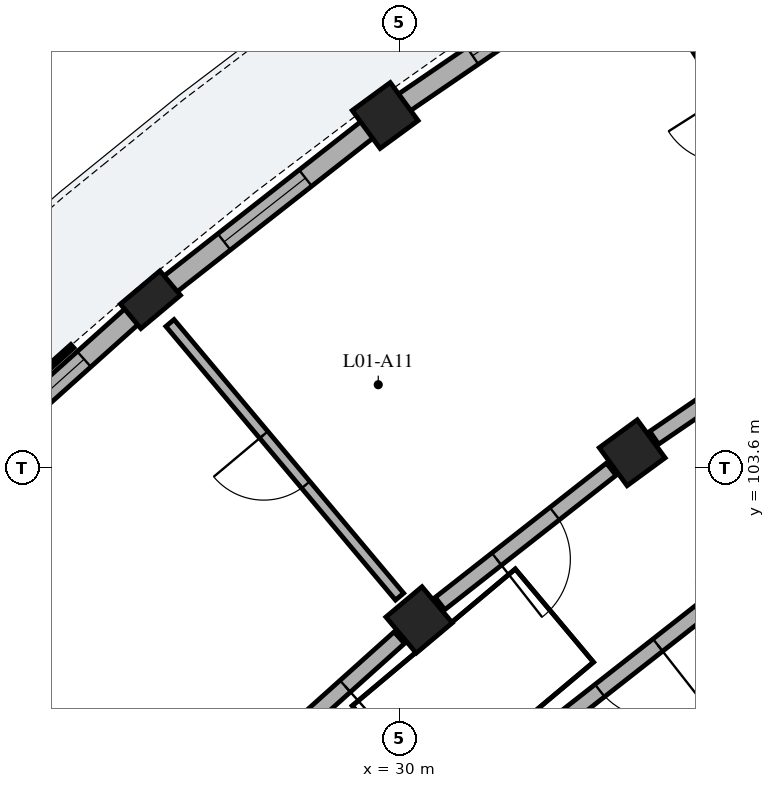
"""IFC4 building model, lengths in metres.
Left out: names, types, materials, properties, quantities, classifications, styles, units other than length and angle.
Written with IfcOpenShell. Run it as: python <this file> out.ifc"""

import sys

from ifc_helpers import new_model, si_unit, direction, frame, frame_2d, origin, origin_2d, place, context, subcontext, project, spatial, rectangle, extrude, element, fill, save


model = new_model("IFC4")
c1 = context("Model", 3, precision=1e-05, world=origin(), true_north=direction((0.0, 1.0)))
c2 = subcontext(c1, "Body", "Model", "MODEL_VIEW")
j1 = project(units=[si_unit("LENGTHUNIT", "METRE"), si_unit("PLANEANGLEUNIT", "RADIAN")], contexts=[c1])
p1 = place(None, origin())
s1 = spatial("IfcSite", under=j1, at=p1, CompositionType="ELEMENT")
p2 = place(p1, origin())
s2 = spatial("IfcBuilding", under=s1, at=p2, CompositionType="ELEMENT")
p3 = place(p2, frame((0.0, 0.0, 4.76)))
s3 = spatial("IfcBuildingStorey", under=s2, at=p3, CompositionType="ELEMENT", Elevation=4.76)
for number, where, z_axis, x_axis in (
    (1, (33.061, 103.804, 0.0), (0.0, 0.0, 1.0), (-0.591, 0.807, 0.0)),
    (2, (29.811, 108.241, 0.0), (0.0, 0.0, 1.0), (-0.591, 0.807, 0.0)),
    (3, (30.257, 101.605, 0.0), (0.0, 0.0, 1.0), (-0.643, 0.766, 0.0)),
):
    element("IfcColumn", number, at=place(p3, frame(where, z_axis=z_axis, x_axis=x_axis)), inside=s3, PredefinedType="COLUMN", context=c2, shape_type="SweptSolid", body=[
        extrude(rectangle(XDim=0.62, YDim=0.62, at=origin_2d()), origin(), (0.0, 0.0, 1.0), 3.825),
    ])
p4 = place(p3, frame((26.722, 105.818, 0.0), z_axis=(0.0, 0.0, 1.0), x_axis=(-0.642787636427, 0.766044420681, 0.0)))
e4 = element("IfcColumn", 4, at=p4, inside=s3, PredefinedType="PILASTER", context=c2, shape_type="SweptSolid", body=[
    extrude(rectangle(XDim=0.42, YDim=0.68, at=origin_2d()), origin(), (0.0, 0.0, 1.0), 3.825),
])
p5 = place(p3, frame((32.904, 110.354, 0.0), z_axis=(0.0, 0.0, 1.0), x_axis=(-0.825744165268, -0.564044832904, 0.0)))
e5 = element("IfcWall", 5, at=p5, inside=s3, PredefinedType="SOLIDWALL", context=c2, shape_type="SweptSolid", body=[
    extrude(rectangle(XDim=3.466, YDim=0.27, at=frame_2d((1.733, 0.0))), origin(), (0.0, 0.0, 1.0), 3.075),
])
p6 = place(p5, frame((1.113, 0.0, 0.55)))
e6 = element("IfcOpeningElement", 6, at=p6, cuts=e5, PredefinedType="OPENING", context=c2, shape_type="SweptSolid", body=[
    extrude(rectangle(XDim=1.24, YDim=1.535, at=frame_2d((0.62, 0.768))), frame((0.0, 0.145, 0.0), z_axis=(0.0, -1.0, 0.0), x_axis=(1.0, 0.0, 0.0)), (0.0, 0.0, 1.0), 0.29),
])
p7 = place(p3, frame((29.591, 108.068, 0.0), z_axis=(0.0, 0.0, 1.0), x_axis=(-0.786811832484, -0.617192952214, 0.0)))
e7 = element("IfcWall", 7, at=p7, inside=s3, PredefinedType="SOLIDWALL", context=c2, shape_type="SweptSolid", body=[
    extrude(rectangle(XDim=3.466, YDim=0.27, at=frame_2d((1.733, 0.0))), origin(), (0.0, 0.0, 1.0), 3.075),
])
p8 = place(p7, frame((1.053, 0.0, 0.55)))
e8 = element("IfcOpeningElement", 8, at=p8, cuts=e7, PredefinedType="OPENING", context=c2, shape_type="SweptSolid", body=[
    extrude(rectangle(XDim=1.36, YDim=1.61, at=frame_2d((0.68, 0.805))), frame((0.0, 0.145, 0.0), z_axis=(0.0, -1.0, 0.0), x_axis=(1.0, 0.0, 0.0)), (0.0, 0.0, 1.0), 0.29),
])
p9 = place(p3, frame((26.588, 105.698, 0.0), z_axis=(0.0, 0.0, 1.0), x_axis=(-0.744424533251, -0.667706607945, 0.0)))
e9 = element("IfcWall", 9, at=p9, inside=s3, PredefinedType="SOLIDWALL", context=c2, shape_type="SweptSolid", body=[
    extrude(rectangle(XDim=3.466, YDim=0.27, at=frame_2d((1.733, 0.0))), origin(), (0.0, 0.0, 1.0), 3.075),
])
p10 = place(p9, frame((0.993, 0.0, 0.55)))
e10 = element("IfcOpeningElement", 10, at=p10, cuts=e9, PredefinedType="OPENING", context=c2, shape_type="SweptSolid", body=[
    extrude(rectangle(XDim=1.48, YDim=1.46, at=frame_2d((0.74, 0.73))), frame((0.0, 0.145, 0.0), z_axis=(0.0, -1.0, 0.0), x_axis=(1.0, 0.0, 0.0)), (0.0, 0.0, 1.0), 0.29),
])
p11 = place(p3, frame((35.789, 106.151, 0.0), z_axis=(0.0, 0.0, 1.0), x_axis=(-0.536492262982, 0.843905238614, 0.0)))
e11 = element("IfcWall", 11, at=p11, inside=s3, PredefinedType="PARTITIONING", context=c2, shape_type="SweptSolid", body=[
    extrude(rectangle(XDim=4.7, YDim=0.115, at=frame_2d((2.35, 0.0))), origin(), (0.0, 0.0, 1.0), 3.09),
])
p12 = place(p11, frame((1.905, 0.0, 0.0)))
e12 = element("IfcOpeningElement", 12, at=p12, cuts=e11, PredefinedType="OPENING", context=c2, shape_type="SweptSolid", body=[
    extrude(rectangle(XDim=0.89, YDim=2.1, at=frame_2d((0.445, 1.05))), frame((0.0, 0.067, 0.0), z_axis=(0.0, -1.0, 0.0), x_axis=(1.0, 0.0, 0.0)), (0.0, 0.0, 1.0), 0.135),
])
p13 = place(p3, frame((35.714, 105.616, 0.0), z_axis=(0.0, 0.0, 1.0), x_axis=(-0.825779671787, -0.563992848947, 0.0)))
e13 = element("IfcWall", 13, at=p13, inside=s3, PredefinedType="PARTITIONING", context=c2, shape_type="SweptSolid", body=[
    extrude(rectangle(XDim=2.863, YDim=0.205, at=frame_2d((1.432, 0.0))), origin(), (0.0, 0.0, 1.0), 3.09),
])
p14 = place(p13, frame((0.937, 0.0, 0.0)))
e14 = element("IfcOpeningElement", 14, at=p14, cuts=e13, PredefinedType="OPENING", context=c2, shape_type="SweptSolid", body=[
    extrude(rectangle(XDim=0.99, YDim=2.16, at=frame_2d((0.495, 1.08))), frame((0.0, 0.113, 0.0), z_axis=(0.0, -1.0, 0.0), x_axis=(1.0, 0.0, 0.0)), (0.0, 0.0, 1.0), 0.225),
])
p15 = place(p3, frame((32.785, 103.588, 0.0), z_axis=(0.0, 0.0, 1.0), x_axis=(-0.786806323554, -0.617199975061, 0.0)))
e15 = element("IfcWall", 15, at=p15, inside=s3, PredefinedType="PARTITIONING", context=c2, shape_type="SweptSolid", body=[
    extrude(rectangle(XDim=2.863, YDim=0.205, at=frame_2d((1.432, 0.0))), origin(), (0.0, 0.0, 1.0), 3.09),
])
p16 = place(p15, frame((0.947, 0.0, 0.0)))
e16 = element("IfcOpeningElement", 16, at=p16, cuts=e15, PredefinedType="OPENING", context=c2, shape_type="SweptSolid", body=[
    extrude(rectangle(XDim=0.97, YDim=2.15, at=frame_2d((0.485, 1.075))), frame((0.0, 0.113, 0.0), z_axis=(0.0, -1.0, 0.0), x_axis=(1.0, 0.0, 0.0)), (0.0, 0.0, 1.0), 0.225),
])
p17 = place(p3, frame((34.085, 101.813, 0.0), z_axis=(0.0, 0.0, 1.0), x_axis=(-0.786835457019, -0.617162833924, 0.0)))
e17 = element("IfcWall", 17, at=p17, inside=s3, PredefinedType="PARTITIONING", context=c2, shape_type="SweptSolid", body=[
    extrude(rectangle(XDim=2.718, YDim=0.205, at=frame_2d((1.359, 0.0))), origin(), (0.0, 0.0, 1.0), 3.09),
])
p18 = place(p17, frame((0.874, 0.0, 0.0)))
e18 = element("IfcOpeningElement", 18, at=p18, cuts=e17, PredefinedType="OPENING", context=c2, shape_type="SweptSolid", body=[
    extrude(rectangle(XDim=0.97, YDim=2.15, at=frame_2d((0.485, 1.075))), frame((0.0, 0.113, 0.0), z_axis=(0.0, -1.0, 0.0), x_axis=(1.0, 0.0, 0.0)), (0.0, 0.0, 1.0), 0.225),
])
p19 = place(p3, frame((30.0, 101.911, 0.0), z_axis=(0.0, 0.0, 1.0), x_axis=(-0.642811926223, 0.766024038465, 0.0)))
e19 = element("IfcWall", 19, at=p19, inside=s3, PredefinedType="PLUMBINGWALL", context=c2, shape_type="SweptSolid", body=[
    extrude(rectangle(XDim=4.7, YDim=0.14, at=frame_2d((2.35, 0.0))), origin(), (0.0, 0.0, 1.0), 3.09),
])
p20 = place(p19, frame((1.92, 0.0, 0.0)))
e20 = element("IfcOpeningElement", 20, at=p20, cuts=e19, PredefinedType="OPENING", context=c2, shape_type="SweptSolid", body=[
    extrude(rectangle(XDim=0.86, YDim=2.06, at=frame_2d((0.43, 1.03))), frame((0.0, 0.08, 0.0), z_axis=(0.0, -1.0, 0.0), x_axis=(1.0, 0.0, 0.0)), (0.0, 0.0, 1.0), 0.16),
])
p21 = place(p3, frame((29.997, 101.371, 0.0), z_axis=(0.0, 0.0, 1.0), x_axis=(-0.744433521088, -0.667696587291, 0.0)))
e21 = element("IfcWall", 21, at=p21, inside=s3, PredefinedType="PARTITIONING", context=c2, shape_type="SweptSolid", body=[
    extrude(rectangle(XDim=2.863, YDim=0.205, at=frame_2d((1.432, 0.0))), origin(), (0.0, 0.0, 1.0), 3.09),
])
p22 = place(p21, frame((0.957, 0.0, 0.0)))
e22 = element("IfcOpeningElement", 22, at=p22, cuts=e21, PredefinedType="OPENING", context=c2, shape_type="SweptSolid", body=[
    extrude(rectangle(XDim=0.95, YDim=2.13, at=frame_2d((0.475, 1.065))), frame((0.0, 0.113, 0.0), z_axis=(0.0, -1.0, 0.0), x_axis=(1.0, 0.0, 0.0)), (0.0, 0.0, 1.0), 0.225),
])
p23 = place(p6, origin())
e23 = element("IfcWindow", 23, at=p23, inside=s3, PartitioningType="SINGLE_PANEL", PredefinedType="WINDOW", context=c2, shape_type="SweptSolid", body=[
    extrude(rectangle(XDim=1.24, YDim=1.535, at=frame_2d((0.62, 0.768))), frame((0.0, 0.03, 0.0), z_axis=(0.0, -1.0, 0.0), x_axis=(1.0, 0.0, 0.0)), (0.0, 0.0, 1.0), 0.06),
])
fill(e6, e23)
p24 = place(p8, origin())
e24 = element("IfcWindow", 24, at=p24, inside=s3, PartitioningType="SINGLE_PANEL", PredefinedType="WINDOW", context=c2, shape_type="SweptSolid", body=[
    extrude(rectangle(XDim=1.36, YDim=1.61, at=frame_2d((0.68, 0.805))), frame((0.0, 0.03, 0.0), z_axis=(0.0, -1.0, 0.0), x_axis=(1.0, 0.0, 0.0)), (0.0, 0.0, 1.0), 0.06),
])
fill(e8, e24)
p25 = place(p10, origin())
e25 = element("IfcWindow", 25, at=p25, inside=s3, PartitioningType="SINGLE_PANEL", PredefinedType="WINDOW", context=c2, shape_type="SweptSolid", body=[
    extrude(rectangle(XDim=1.48, YDim=1.46, at=frame_2d((0.74, 0.73))), frame((0.0, 0.03, 0.0), z_axis=(0.0, -1.0, 0.0), x_axis=(1.0, 0.0, 0.0)), (0.0, 0.0, 1.0), 0.06),
])
fill(e10, e25)
p26 = place(p16, origin())
e26 = element("IfcDoor", 26, at=p26, inside=s3, OperationType="SINGLE_SWING_RIGHT", PredefinedType="DOOR", context=c2, shape_type="SweptSolid", body=[
    extrude(rectangle(XDim=0.97, YDim=2.15, at=frame_2d((0.485, 1.075))), frame((0.0, 0.025, 0.0), z_axis=(0.0, -1.0, 0.0), x_axis=(1.0, 0.0, 0.0)), (0.0, 0.0, 1.0), 0.05),
])
fill(e16, e26)
p27 = place(p18, origin())
e27 = element("IfcDoor", 27, at=p27, inside=s3, OperationType="SINGLE_SWING_LEFT", PredefinedType="DOOR", context=c2, shape_type="SweptSolid", body=[
    extrude(rectangle(XDim=0.97, YDim=2.15, at=frame_2d((0.485, 1.075))), frame((0.0, 0.025, 0.0), z_axis=(0.0, -1.0, 0.0), x_axis=(1.0, 0.0, 0.0)), (0.0, 0.0, 1.0), 0.05),
])
fill(e18, e27)
p28 = place(p20, origin())
e28 = element("IfcDoor", 28, at=p28, inside=s3, OperationType="SINGLE_SWING_RIGHT", PredefinedType="DOOR", context=c2, shape_type="SweptSolid", body=[
    extrude(rectangle(XDim=0.86, YDim=2.06, at=frame_2d((0.43, 1.03))), frame((0.0, 0.025, 0.0), z_axis=(0.0, -1.0, 0.0), x_axis=(1.0, 0.0, 0.0)), (0.0, 0.0, 1.0), 0.05),
])
fill(e20, e28)
p29 = place(p22, origin())
e29 = element("IfcDoor", 29, at=p29, inside=s3, OperationType="SINGLE_SWING_LEFT", PredefinedType="DOOR", context=c2, shape_type="SweptSolid", body=[
    extrude(rectangle(XDim=0.95, YDim=2.13, at=frame_2d((0.475, 1.065))), frame((0.0, 0.025, 0.0), z_axis=(0.0, -1.0, 0.0), x_axis=(1.0, 0.0, 0.0)), (0.0, 0.0, 1.0), 0.05),
])
fill(e22, e29)
save(model, sys.argv[1])
